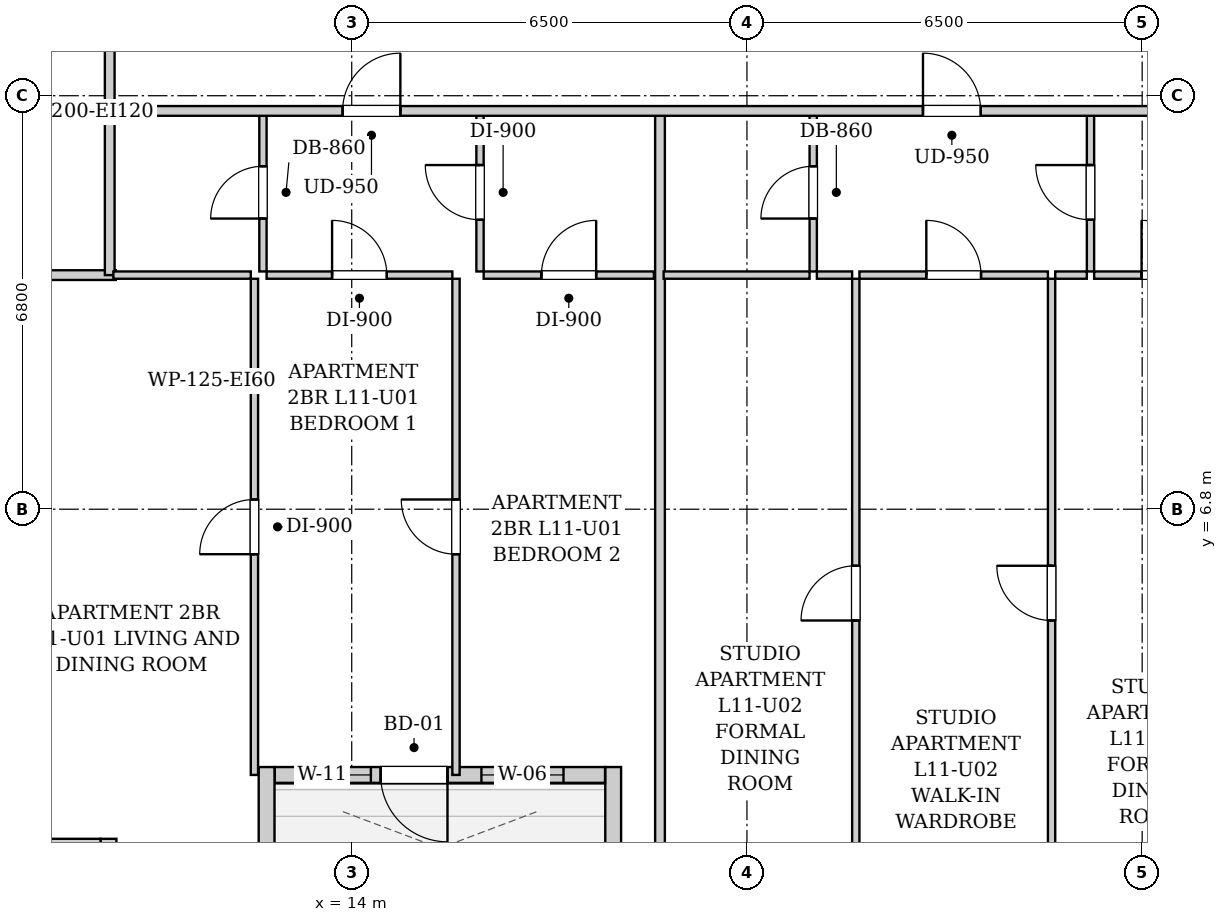
"""IFC4 building model, lengths in metres.
Left out: names, types, materials, properties, quantities, classifications, styles, units other than length and angle.
Written with IfcOpenShell. Run it as: python <this file> out.ifc"""

import sys

from ifc_helpers import new_model, si_unit, direction, frame, frame_2d, origin, place, context, subcontext, project, spatial, rectangle, extrude, element, fill, save


model = new_model("IFC4")
c1 = context("Model", 3, precision=1e-05, world=origin(), true_north=direction((0.0, 1.0)))
c2 = subcontext(c1, "Body", "Model", "MODEL_VIEW")
j1 = project(units=[si_unit("LENGTHUNIT", "METRE"), si_unit("PLANEANGLEUNIT", "RADIAN")], contexts=[c1])
p1 = place(None, origin())
s1 = spatial("IfcSite", under=j1, at=p1, CompositionType="ELEMENT")
p2 = place(p1, origin())
s2 = spatial("IfcBuilding", under=s1, at=p2, CompositionType="ELEMENT")
p3 = place(p2, frame((0.0, 0.0, 45.0)))
s3 = spatial("IfcBuildingStorey", under=s2, at=p3, CompositionType="ELEMENT", Elevation=45.0)
p4 = place(p3, frame((18.3, 0.16, 0.0), z_axis=(0.0, 0.0, 1.0), x_axis=(0.0, 1.0, 0.0)))
e1 = element("IfcWall", 1, at=p4, inside=s3, PredefinedType="SOLIDWALL", context=c2, shape_type="SweptSolid", body=[
    extrude(rectangle(XDim=2.4, YDim=0.26, at=frame_2d((1.2, 0.0))), origin(), (0.0, 0.0, 1.0), 2.94),
])
p5 = place(p3, frame((18.166, 2.43, 0.0), z_axis=(0.0, 0.0, 1.0), x_axis=(-1.0, 0.0, 0.0)))
e2 = element("IfcWall", 2, at=p5, inside=s3, PredefinedType="SOLIDWALL", context=c2, shape_type="SweptSolid", body=[
    extrude(rectangle(XDim=5.432, YDim=0.26, at=frame_2d((2.716, 0.0))), origin(), (0.0, 0.0, 1.0), 2.94),
])
p6 = place(p5, frame((2.591, 0.0, 0.0)))
e3 = element("IfcOpeningElement", 3, at=p6, cuts=e2, PredefinedType="OPENING", context=c2, shape_type="SweptSolid", body=[
    extrude(rectangle(XDim=1.1, YDim=2.0, at=frame_2d((0.55, 1.0))), frame((0.0, 0.14, 0.0), z_axis=(0.0, -1.0, 0.0), x_axis=(1.0, 0.0, 0.0)), (0.0, 0.0, 1.0), 0.28),
])
p7 = place(p5, frame((3.851, 0.0, 0.55)))
e4 = element("IfcOpeningElement", 4, at=p7, cuts=e2, PredefinedType="OPENING", context=c2, shape_type="SweptSolid", body=[
    extrude(rectangle(XDim=0.85, YDim=1.2, at=frame_2d((0.425, 0.6))), frame((0.0, 0.14, 0.0), z_axis=(0.0, -1.0, 0.0), x_axis=(1.0, 0.0, 0.0)), (0.0, 0.0, 1.0), 0.28),
])
p8 = place(p5, frame((0.683, 0.0, 0.85)))
e5 = element("IfcOpeningElement", 5, at=p8, cuts=e2, PredefinedType="OPENING", context=c2, shape_type="SweptSolid", body=[
    extrude(rectangle(XDim=1.35, YDim=1.65, at=frame_2d((0.675, 0.825))), frame((0.0, 0.14, 0.0), z_axis=(0.0, -1.0, 0.0), x_axis=(1.0, 0.0, 0.0)), (0.0, 0.0, 1.0), 0.28),
])
p9 = place(p3, frame((12.6, 2.56, 0.0), z_axis=(0.0, 0.0, 1.0), x_axis=(0.0, -1.0, 0.0)))
e6 = element("IfcWall", 6, at=p9, inside=s3, PredefinedType="SOLIDWALL", context=c2, shape_type="SweptSolid", body=[
    extrude(rectangle(XDim=2.4, YDim=0.26, at=frame_2d((1.2, 0.0))), origin(), (0.0, 0.0, 1.0), 2.94),
])
p10 = place(p3, frame((10.0, 0.302, 0.0), z_axis=(0.0, 0.0, 1.0), x_axis=(0.0, 1.0, 0.0)))
e7 = element("IfcWall", 7, at=p10, inside=s3, PredefinedType="SOLIDWALL", context=c2, shape_type="SweptSolid", body=[
    extrude(rectangle(XDim=1.078, YDim=0.26, at=frame_2d((0.539, 0.0))), origin(), (0.0, 0.0, 1.0), 2.94),
])
p11 = place(p3, frame((9.868, 1.25, 0.0), z_axis=(0.0, 0.0, 1.0), x_axis=(-1.0, 0.0, 0.0)))
e8 = element("IfcWall", 8, at=p11, inside=s3, PredefinedType="SOLIDWALL", context=c2, shape_type="SweptSolid", body=[
    extrude(rectangle(XDim=1.248, YDim=0.26, at=frame_2d((0.624, 0.0))), origin(), (0.0, 0.0, 1.0), 2.94),
])
p12 = place(p3, frame((10.02, 13.35, 0.0), z_axis=(0.0, 0.0, 1.0), x_axis=(0.0, 1.0, 0.0)))
e9 = element("IfcWall", 9, at=p12, inside=s3, PredefinedType="PARTITIONING", context=c2, shape_type="SweptSolid", body=[
    extrude(rectangle(XDim=1.74, YDim=0.16, at=frame_2d((0.87, 0.0))), origin(), (0.0, 0.0, 1.0), 2.94),
])
p13 = place(p3, frame((7.78, 10.65, 0.0), z_axis=(0.0, 0.0, 1.0), x_axis=(1.0, 0.0, 0.0)))
e10 = element("IfcWall", 10, at=p13, inside=s3, PredefinedType="PARTITIONING", context=c2, shape_type="SweptSolid", body=[
    extrude(rectangle(XDim=2.34, YDim=0.16, at=frame_2d((1.17, 0.0))), origin(), (0.0, 0.0, 1.0), 2.94),
])
p14 = place(p3, frame((10.02, 10.65, 0.0), z_axis=(0.0, 0.0, 1.0), x_axis=(0.0, 1.0, 0.0)))
e11 = element("IfcWall", 11, at=p14, inside=s3, PredefinedType="PARTITIONING", context=c2, shape_type="SweptSolid", body=[
    extrude(rectangle(XDim=2.66, YDim=0.16, at=frame_2d((1.33, 0.0))), origin(), (0.0, 0.0, 1.0), 2.94),
])
p15 = place(p3, frame((12.54, 10.71, 0.0), z_axis=(0.0, 0.0, 1.0), x_axis=(0.0, 1.0, 0.0)))
e12 = element("IfcWall", 12, at=p15, inside=s3, PredefinedType="PARTITIONING", context=c2, shape_type="SweptSolid", body=[
    extrude(rectangle(XDim=2.6, YDim=0.12, at=frame_2d((1.3, 0.0))), origin(), (0.0, 0.0, 1.0), 2.94),
])
p16 = place(p15, frame((0.87, 0.0, 0.0)))
e13 = element("IfcOpeningElement", 13, at=p16, cuts=e12, PredefinedType="OPENING", context=c2, shape_type="SweptSolid", body=[
    extrude(rectangle(XDim=0.86, YDim=2.05, at=frame_2d((0.43, 1.025))), frame((0.0, 0.07, 0.0), z_axis=(0.0, -1.0, 0.0), x_axis=(1.0, 0.0, 0.0)), (0.0, 0.0, 1.0), 0.14),
])
p17 = place(p3, frame((10.08, 10.65, 0.0), z_axis=(0.0, 0.0, 1.0), x_axis=(1.0, 0.0, 0.0)))
e14 = element("IfcWall", 14, at=p17, inside=s3, PredefinedType="PARTITIONING", context=c2, shape_type="SweptSolid", body=[
    extrude(rectangle(XDim=2.26, YDim=0.12, at=frame_2d((1.13, 0.0))), origin(), (0.0, 0.0, 1.0), 2.94),
])
p18 = place(p3, frame((16.11, 10.71, 0.0), z_axis=(0.0, 0.0, 1.0), x_axis=(0.0, 1.0, 0.0)))
e15 = element("IfcWall", 15, at=p18, inside=s3, PredefinedType="PARTITIONING", context=c2, shape_type="SweptSolid", body=[
    extrude(rectangle(XDim=2.6, YDim=0.12, at=frame_2d((1.3, 0.0))), origin(), (0.0, 0.0, 1.0), 2.94),
])
p19 = place(p18, frame((0.85, 0.0, 0.0)))
e16 = element("IfcOpeningElement", 16, at=p19, cuts=e15, PredefinedType="OPENING", context=c2, shape_type="SweptSolid", body=[
    extrude(rectangle(XDim=0.9, YDim=2.05, at=frame_2d((0.45, 1.025))), frame((0.0, 0.07, 0.0), z_axis=(0.0, -1.0, 0.0), x_axis=(1.0, 0.0, 0.0)), (0.0, 0.0, 1.0), 0.14),
])
p20 = place(p3, frame((12.6, 10.65, 0.0), z_axis=(0.0, 0.0, 1.0), x_axis=(1.0, 0.0, 0.0)))
e17 = element("IfcWall", 17, at=p20, inside=s3, PredefinedType="PARTITIONING", context=c2, shape_type="SweptSolid", body=[
    extrude(rectangle(XDim=3.055, YDim=0.12, at=frame_2d((1.527, 0.0))), origin(), (0.0, 0.0, 1.0), 2.94),
])
p21 = place(p20, frame((1.077, 0.0, 0.0)))
e18 = element("IfcOpeningElement", 18, at=p21, cuts=e17, PredefinedType="OPENING", context=c2, shape_type="SweptSolid", body=[
    extrude(rectangle(XDim=0.9, YDim=2.05, at=frame_2d((0.45, 1.025))), frame((0.0, 0.07, 0.0), z_axis=(0.0, -1.0, 0.0), x_axis=(1.0, 0.0, 0.0)), (0.0, 0.0, 1.0), 0.14),
])
p22 = place(p3, frame((16.17, 10.65, 0.0), z_axis=(0.0, 0.0, 1.0), x_axis=(1.0, 0.0, 0.0)))
e19 = element("IfcWall", 19, at=p22, inside=s3, PredefinedType="PARTITIONING", context=c2, shape_type="SweptSolid", body=[
    extrude(rectangle(XDim=2.8, YDim=0.12, at=frame_2d((1.4, 0.0))), origin(), (0.0, 0.0, 1.0), 2.94),
])
p23 = place(p22, frame((0.95, 0.0, 0.0)))
e20 = element("IfcOpeningElement", 20, at=p23, cuts=e19, PredefinedType="OPENING", context=c2, shape_type="SweptSolid", body=[
    extrude(rectangle(XDim=0.9, YDim=2.05, at=frame_2d((0.45, 1.025))), frame((0.0, 0.07, 0.0), z_axis=(0.0, -1.0, 0.0), x_axis=(1.0, 0.0, 0.0)), (0.0, 0.0, 1.0), 0.14),
])
p24 = place(p3, frame((12.4, 2.43, 0.0), z_axis=(0.0, 0.0, 1.0), x_axis=(0.0, 1.0, 0.0)))
e21 = element("IfcWall", 21, at=p24, inside=s3, PredefinedType="PARTITIONING", context=c2, shape_type="SweptSolid", body=[
    extrude(rectangle(XDim=8.16, YDim=0.12, at=frame_2d((4.08, 0.0))), origin(), (0.0, 0.0, 1.0), 2.94),
])
p25 = place(p24, frame((3.63, 0.0, 0.0)))
e22 = element("IfcOpeningElement", 22, at=p25, cuts=e21, PredefinedType="OPENING", context=c2, shape_type="SweptSolid", body=[
    extrude(rectangle(XDim=0.9, YDim=2.05, at=frame_2d((0.45, 1.025))), frame((0.0, 0.07, 0.0), z_axis=(0.0, -1.0, 0.0), x_axis=(1.0, 0.0, 0.0)), (0.0, 0.0, 1.0), 0.14),
])
p26 = place(p3, frame((15.715, 2.43, 0.0), z_axis=(0.0, 0.0, 1.0), x_axis=(0.0, 1.0, 0.0)))
e23 = element("IfcWall", 23, at=p26, inside=s3, PredefinedType="PARTITIONING", context=c2, shape_type="SweptSolid", body=[
    extrude(rectangle(XDim=8.16, YDim=0.12, at=frame_2d((4.08, 0.0))), origin(), (0.0, 0.0, 1.0), 2.94),
])
p27 = place(p26, frame((3.63, 0.0, 0.0)))
e24 = element("IfcOpeningElement", 24, at=p27, cuts=e23, PredefinedType="OPENING", context=c2, shape_type="SweptSolid", body=[
    extrude(rectangle(XDim=0.9, YDim=2.05, at=frame_2d((0.45, 1.025))), frame((0.0, 0.07, 0.0), z_axis=(0.0, -1.0, 0.0), x_axis=(1.0, 0.0, 0.0)), (0.0, 0.0, 1.0), 0.14),
])
p28 = place(p3, frame((19.07, 0.28, 0.0), z_axis=(0.0, 0.0, 1.0), x_axis=(0.0, 1.0, 0.0)))
e25 = element("IfcWall", 25, at=p28, inside=s3, PredefinedType="PARTITIONING", context=c2, shape_type="SweptSolid", body=[
    extrude(rectangle(XDim=13.03, YDim=0.16, at=frame_2d((6.515, 0.0))), origin(), (0.0, 0.0, 1.0), 2.94),
])
p29 = place(p3, frame((21.59, 10.71, 0.0), z_axis=(0.0, 0.0, 1.0), x_axis=(0.0, 1.0, 0.0)))
e26 = element("IfcWall", 26, at=p29, inside=s3, PredefinedType="PARTITIONING", context=c2, shape_type="SweptSolid", body=[
    extrude(rectangle(XDim=2.6, YDim=0.12, at=frame_2d((1.3, 0.0))), origin(), (0.0, 0.0, 1.0), 2.94),
])
p30 = place(p29, frame((0.87, 0.0, 0.0)))
e27 = element("IfcOpeningElement", 27, at=p30, cuts=e26, PredefinedType="OPENING", context=c2, shape_type="SweptSolid", body=[
    extrude(rectangle(XDim=0.86, YDim=2.05, at=frame_2d((0.43, 1.025))), frame((0.0, 0.07, 0.0), z_axis=(0.0, -1.0, 0.0), x_axis=(1.0, 0.0, 0.0)), (0.0, 0.0, 1.0), 0.14),
])
p31 = place(p3, frame((19.13, 10.65, 0.0), z_axis=(0.0, 0.0, 1.0), x_axis=(1.0, 0.0, 0.0)))
e28 = element("IfcWall", 28, at=p31, inside=s3, PredefinedType="PARTITIONING", context=c2, shape_type="SweptSolid", body=[
    extrude(rectangle(XDim=2.4, YDim=0.12, at=frame_2d((1.2, 0.0))), origin(), (0.0, 0.0, 1.0), 2.94),
])
p32 = place(p3, frame((26.15, 10.71, 0.0), z_axis=(0.0, 0.0, 1.0), x_axis=(0.0, 1.0, 0.0)))
e29 = element("IfcWall", 29, at=p32, inside=s3, PredefinedType="PARTITIONING", context=c2, shape_type="SweptSolid", body=[
    extrude(rectangle(XDim=2.6, YDim=0.12, at=frame_2d((1.3, 0.0))), origin(), (0.0, 0.0, 1.0), 2.94),
])
p33 = place(p32, frame((0.85, 0.0, 0.0)))
e30 = element("IfcOpeningElement", 30, at=p33, cuts=e29, PredefinedType="OPENING", context=c2, shape_type="SweptSolid", body=[
    extrude(rectangle(XDim=0.9, YDim=2.05, at=frame_2d((0.45, 1.025))), frame((0.0, 0.07, 0.0), z_axis=(0.0, -1.0, 0.0), x_axis=(1.0, 0.0, 0.0)), (0.0, 0.0, 1.0), 0.14),
])
p34 = place(p3, frame((21.65, 10.65, 0.0), z_axis=(0.0, 0.0, 1.0), x_axis=(1.0, 0.0, 0.0)))
e31 = element("IfcWall", 31, at=p34, inside=s3, PredefinedType="PARTITIONING", context=c2, shape_type="SweptSolid", body=[
    extrude(rectangle(XDim=0.58, YDim=0.12, at=frame_2d((0.29, 0.0))), origin(), (0.0, 0.0, 1.0), 2.94),
])
p35 = place(p3, frame((22.35, 10.65, 0.0), z_axis=(0.0, 0.0, 1.0), x_axis=(1.0, 0.0, 0.0)))
e32 = element("IfcWall", 32, at=p35, inside=s3, PredefinedType="PARTITIONING", context=c2, shape_type="SweptSolid", body=[
    extrude(rectangle(XDim=3.1, YDim=0.12, at=frame_2d((1.55, 0.0))), origin(), (0.0, 0.0, 1.0), 2.94),
])
p36 = place(p35, frame((1.1, 0.0, 0.0)))
e33 = element("IfcOpeningElement", 33, at=p36, cuts=e32, PredefinedType="OPENING", context=c2, shape_type="SweptSolid", body=[
    extrude(rectangle(XDim=0.9, YDim=2.05, at=frame_2d((0.45, 1.025))), frame((0.0, 0.07, 0.0), z_axis=(0.0, -1.0, 0.0), x_axis=(1.0, 0.0, 0.0)), (0.0, 0.0, 1.0), 0.14),
])
p37 = place(p3, frame((25.57, 10.65, 0.0), z_axis=(0.0, 0.0, 1.0), x_axis=(1.0, 0.0, 0.0)))
e34 = element("IfcWall", 34, at=p37, inside=s3, PredefinedType="PARTITIONING", context=c2, shape_type="SweptSolid", body=[
    extrude(rectangle(XDim=0.52, YDim=0.12, at=frame_2d((0.26, 0.0))), origin(), (0.0, 0.0, 1.0), 2.94),
])
p38 = place(p3, frame((26.21, 10.65, 0.0), z_axis=(0.0, 0.0, 1.0), x_axis=(1.0, 0.0, 0.0)))
e35 = element("IfcWall", 35, at=p38, inside=s3, PredefinedType="PARTITIONING", context=c2, shape_type="SweptSolid", body=[
    extrude(rectangle(XDim=2.46, YDim=0.12, at=frame_2d((1.23, 0.0))), origin(), (0.0, 0.0, 1.0), 2.94),
])
p39 = place(p38, frame((0.78, 0.0, 0.0)))
e36 = element("IfcOpeningElement", 36, at=p39, cuts=e35, PredefinedType="OPENING", context=c2, shape_type="SweptSolid", body=[
    extrude(rectangle(XDim=0.9, YDim=2.05, at=frame_2d((0.45, 1.025))), frame((0.0, 0.07, 0.0), z_axis=(0.0, -1.0, 0.0), x_axis=(1.0, 0.0, 0.0)), (0.0, 0.0, 1.0), 0.14),
])
p40 = place(p3, frame((22.29, 0.28, 0.0), z_axis=(0.0, 0.0, 1.0), x_axis=(0.0, 1.0, 0.0)))
e37 = element("IfcWall", 37, at=p40, inside=s3, PredefinedType="PARTITIONING", context=c2, shape_type="SweptSolid", body=[
    extrude(rectangle(XDim=10.31, YDim=0.12, at=frame_2d((5.155, 0.0))), origin(), (0.0, 0.0, 1.0), 2.94),
])
p41 = place(p40, frame((4.69, 0.0, 0.0)))
e38 = element("IfcOpeningElement", 38, at=p41, cuts=e37, PredefinedType="OPENING", context=c2, shape_type="SweptSolid", body=[
    extrude(rectangle(XDim=0.9, YDim=2.05, at=frame_2d((0.45, 1.025))), frame((0.0, 0.07, 0.0), z_axis=(0.0, -1.0, 0.0), x_axis=(1.0, 0.0, 0.0)), (0.0, 0.0, 1.0), 0.14),
])
p42 = place(p3, frame((25.51, 0.28, 0.0), z_axis=(0.0, 0.0, 1.0), x_axis=(0.0, 1.0, 0.0)))
e39 = element("IfcWall", 39, at=p42, inside=s3, PredefinedType="PARTITIONING", context=c2, shape_type="SweptSolid", body=[
    extrude(rectangle(XDim=10.31, YDim=0.12, at=frame_2d((5.155, 0.0))), origin(), (0.0, 0.0, 1.0), 2.94),
])
p43 = place(p42, frame((4.69, 0.0, 0.0)))
e40 = element("IfcOpeningElement", 40, at=p43, cuts=e39, PredefinedType="OPENING", context=c2, shape_type="SweptSolid", body=[
    extrude(rectangle(XDim=0.9, YDim=2.05, at=frame_2d((0.45, 1.025))), frame((0.0, 0.07, 0.0), z_axis=(0.0, -1.0, 0.0), x_axis=(1.0, 0.0, 0.0)), (0.0, 0.0, 1.0), 0.14),
])
p44 = place(p3, frame((10.05, 13.35, 0.0), z_axis=(0.0, 0.0, 1.0), x_axis=(1.0, 0.0, 0.0)))
e41 = element("IfcWall", 41, at=p44, inside=s3, PredefinedType="PARTITIONING", context=c2, shape_type="SweptSolid", body=[
    extrude(rectangle(XDim=33.9, YDim=0.16, at=frame_2d((16.95, 0.0))), origin(), (0.0, 0.0, 1.0), 2.94),
])
p45 = place(p44, frame((3.8, 0.0, 0.0)))
e42 = element("IfcOpeningElement", 42, at=p45, cuts=e41, PredefinedType="OPENING", context=c2, shape_type="SweptSolid", body=[
    extrude(rectangle(XDim=0.95, YDim=2.1, at=frame_2d((0.475, 1.05))), frame((0.0, 0.09, 0.0), z_axis=(0.0, -1.0, 0.0), x_axis=(1.0, 0.0, 0.0)), (0.0, 0.0, 1.0), 0.18),
])
p46 = place(p44, frame((13.345, 0.0, 0.0)))
e43 = element("IfcOpeningElement", 43, at=p46, cuts=e41, PredefinedType="OPENING", context=c2, shape_type="SweptSolid", body=[
    extrude(rectangle(XDim=0.95, YDim=2.1, at=frame_2d((0.475, 1.05))), frame((0.0, 0.09, 0.0), z_axis=(0.0, -1.0, 0.0), x_axis=(1.0, 0.0, 0.0)), (0.0, 0.0, 1.0), 0.18),
])
p47 = place(p16, origin())
e44 = element("IfcDoor", 44, at=p47, inside=s3, OperationType="SINGLE_SWING_LEFT", PredefinedType="DOOR", context=c2, shape_type="SweptSolid", body=[
    extrude(rectangle(XDim=0.86, YDim=2.05, at=frame_2d((0.43, 1.025))), frame((0.0, 0.025, 0.0), z_axis=(0.0, -1.0, 0.0), x_axis=(1.0, 0.0, 0.0)), (0.0, 0.0, 1.0), 0.05),
])
fill(e13, e44)
p48 = place(p19, origin())
e45 = element("IfcDoor", 45, at=p48, inside=s3, OperationType="SINGLE_SWING_RIGHT", PredefinedType="DOOR", context=c2, shape_type="SweptSolid", body=[
    extrude(rectangle(XDim=0.9, YDim=2.05, at=frame_2d((0.45, 1.025))), frame((0.0, 0.025, 0.0), z_axis=(0.0, -1.0, 0.0), x_axis=(1.0, 0.0, 0.0)), (0.0, 0.0, 1.0), 0.05),
])
fill(e16, e45)
p49 = place(p21, origin())
e46 = element("IfcDoor", 46, at=p49, inside=s3, OperationType="SINGLE_SWING_LEFT", PredefinedType="DOOR", context=c2, shape_type="SweptSolid", body=[
    extrude(rectangle(XDim=0.9, YDim=2.05, at=frame_2d((0.45, 1.025))), frame((0.0, 0.025, 0.0), z_axis=(0.0, -1.0, 0.0), x_axis=(1.0, 0.0, 0.0)), (0.0, 0.0, 1.0), 0.05),
])
fill(e18, e46)
p50 = place(p23, origin())
e47 = element("IfcDoor", 47, at=p50, inside=s3, OperationType="SINGLE_SWING_RIGHT", PredefinedType="DOOR", context=c2, shape_type="SweptSolid", body=[
    extrude(rectangle(XDim=0.9, YDim=2.05, at=frame_2d((0.45, 1.025))), frame((0.0, 0.025, 0.0), z_axis=(0.0, -1.0, 0.0), x_axis=(1.0, 0.0, 0.0)), (0.0, 0.0, 1.0), 0.05),
])
fill(e20, e47)
p51 = place(p25, origin())
e48 = element("IfcDoor", 48, at=p51, inside=s3, OperationType="SINGLE_SWING_LEFT", PredefinedType="DOOR", context=c2, shape_type="SweptSolid", body=[
    extrude(rectangle(XDim=0.9, YDim=2.05, at=frame_2d((0.45, 1.025))), frame((0.0, 0.025, 0.0), z_axis=(0.0, -1.0, 0.0), x_axis=(1.0, 0.0, 0.0)), (0.0, 0.0, 1.0), 0.05),
])
fill(e22, e48)
p52 = place(p27, origin())
e49 = element("IfcDoor", 49, at=p52, inside=s3, OperationType="SINGLE_SWING_RIGHT", PredefinedType="DOOR", context=c2, shape_type="SweptSolid", body=[
    extrude(rectangle(XDim=0.9, YDim=2.05, at=frame_2d((0.45, 1.025))), frame((0.0, 0.025, 0.0), z_axis=(0.0, -1.0, 0.0), x_axis=(1.0, 0.0, 0.0)), (0.0, 0.0, 1.0), 0.05),
])
fill(e24, e49)
p53 = place(p30, origin())
e50 = element("IfcDoor", 50, at=p53, inside=s3, OperationType="SINGLE_SWING_LEFT", PredefinedType="DOOR", context=c2, shape_type="SweptSolid", body=[
    extrude(rectangle(XDim=0.86, YDim=2.05, at=frame_2d((0.43, 1.025))), frame((0.0, 0.025, 0.0), z_axis=(0.0, -1.0, 0.0), x_axis=(1.0, 0.0, 0.0)), (0.0, 0.0, 1.0), 0.05),
])
fill(e27, e50)
p54 = place(p33, origin())
e51 = element("IfcDoor", 51, at=p54, inside=s3, OperationType="SINGLE_SWING_RIGHT", PredefinedType="DOOR", context=c2, shape_type="SweptSolid", body=[
    extrude(rectangle(XDim=0.9, YDim=2.05, at=frame_2d((0.45, 1.025))), frame((0.0, 0.025, 0.0), z_axis=(0.0, -1.0, 0.0), x_axis=(1.0, 0.0, 0.0)), (0.0, 0.0, 1.0), 0.05),
])
fill(e30, e51)
p55 = place(p36, origin())
e52 = element("IfcDoor", 52, at=p55, inside=s3, OperationType="SINGLE_SWING_LEFT", PredefinedType="DOOR", context=c2, shape_type="SweptSolid", body=[
    extrude(rectangle(XDim=0.9, YDim=2.05, at=frame_2d((0.45, 1.025))), frame((0.0, 0.025, 0.0), z_axis=(0.0, -1.0, 0.0), x_axis=(1.0, 0.0, 0.0)), (0.0, 0.0, 1.0), 0.05),
])
fill(e33, e52)
p56 = place(p39, origin())
e53 = element("IfcDoor", 53, at=p56, inside=s3, OperationType="SINGLE_SWING_LEFT", PredefinedType="DOOR", context=c2, shape_type="SweptSolid", body=[
    extrude(rectangle(XDim=0.9, YDim=2.05, at=frame_2d((0.45, 1.025))), frame((0.0, 0.025, 0.0), z_axis=(0.0, -1.0, 0.0), x_axis=(1.0, 0.0, 0.0)), (0.0, 0.0, 1.0), 0.05),
])
fill(e36, e53)
p57 = place(p41, origin())
e54 = element("IfcDoor", 54, at=p57, inside=s3, OperationType="SINGLE_SWING_LEFT", PredefinedType="DOOR", context=c2, shape_type="SweptSolid", body=[
    extrude(rectangle(XDim=0.9, YDim=2.05, at=frame_2d((0.45, 1.025))), frame((0.0, 0.025, 0.0), z_axis=(0.0, -1.0, 0.0), x_axis=(1.0, 0.0, 0.0)), (0.0, 0.0, 1.0), 0.05),
])
fill(e38, e54)
p58 = place(p43, origin())
e55 = element("IfcDoor", 55, at=p58, inside=s3, OperationType="SINGLE_SWING_RIGHT", PredefinedType="DOOR", context=c2, shape_type="SweptSolid", body=[
    extrude(rectangle(XDim=0.9, YDim=2.05, at=frame_2d((0.45, 1.025))), frame((0.0, 0.025, 0.0), z_axis=(0.0, -1.0, 0.0), x_axis=(1.0, 0.0, 0.0)), (0.0, 0.0, 1.0), 0.05),
])
fill(e40, e55)
p59 = place(p45, origin())
e56 = element("IfcDoor", 56, at=p59, inside=s3, OperationType="SINGLE_SWING_RIGHT", PredefinedType="DOOR", context=c2, shape_type="SweptSolid", body=[
    extrude(rectangle(XDim=0.95, YDim=2.1, at=frame_2d((0.475, 1.05))), frame((0.0, 0.025, 0.0), z_axis=(0.0, -1.0, 0.0), x_axis=(1.0, 0.0, 0.0)), (0.0, 0.0, 1.0), 0.05),
])
fill(e42, e56)
p60 = place(p46, origin())
e57 = element("IfcDoor", 57, at=p60, inside=s3, OperationType="SINGLE_SWING_LEFT", PredefinedType="DOOR", context=c2, shape_type="SweptSolid", body=[
    extrude(rectangle(XDim=0.95, YDim=2.1, at=frame_2d((0.475, 1.05))), frame((0.0, 0.025, 0.0), z_axis=(0.0, -1.0, 0.0), x_axis=(1.0, 0.0, 0.0)), (0.0, 0.0, 1.0), 0.05),
])
fill(e43, e57)
p61 = place(p6, origin())
e58 = element("IfcDoor", 58, at=p61, inside=s3, OperationType="SINGLE_SWING_LEFT", PredefinedType="DOOR", context=c2, shape_type="SweptSolid", body=[
    extrude(rectangle(XDim=1.1, YDim=2.0, at=frame_2d((0.55, 1.0))), frame((0.0, 0.025, 0.0), z_axis=(0.0, -1.0, 0.0), x_axis=(1.0, 0.0, 0.0)), (0.0, 0.0, 1.0), 0.05),
])
fill(e3, e58)
p62 = place(p7, origin())
e59 = element("IfcWindow", 59, at=p62, inside=s3, PartitioningType="SINGLE_PANEL", PredefinedType="WINDOW", context=c2, shape_type="SweptSolid", body=[
    extrude(rectangle(XDim=0.85, YDim=1.2, at=frame_2d((0.425, 0.6))), frame((0.0, 0.03, 0.0), z_axis=(0.0, -1.0, 0.0), x_axis=(1.0, 0.0, 0.0)), (0.0, 0.0, 1.0), 0.06),
])
fill(e4, e59)
p63 = place(p8, origin())
e60 = element("IfcWindow", 60, at=p63, inside=s3, PartitioningType="SINGLE_PANEL", PredefinedType="WINDOW", context=c2, shape_type="SweptSolid", body=[
    extrude(rectangle(XDim=1.35, YDim=1.65, at=frame_2d((0.675, 0.825))), frame((0.0, 0.03, 0.0), z_axis=(0.0, -1.0, 0.0), x_axis=(1.0, 0.0, 0.0)), (0.0, 0.0, 1.0), 0.06),
])
fill(e5, e60)
save(model, sys.argv[1])
